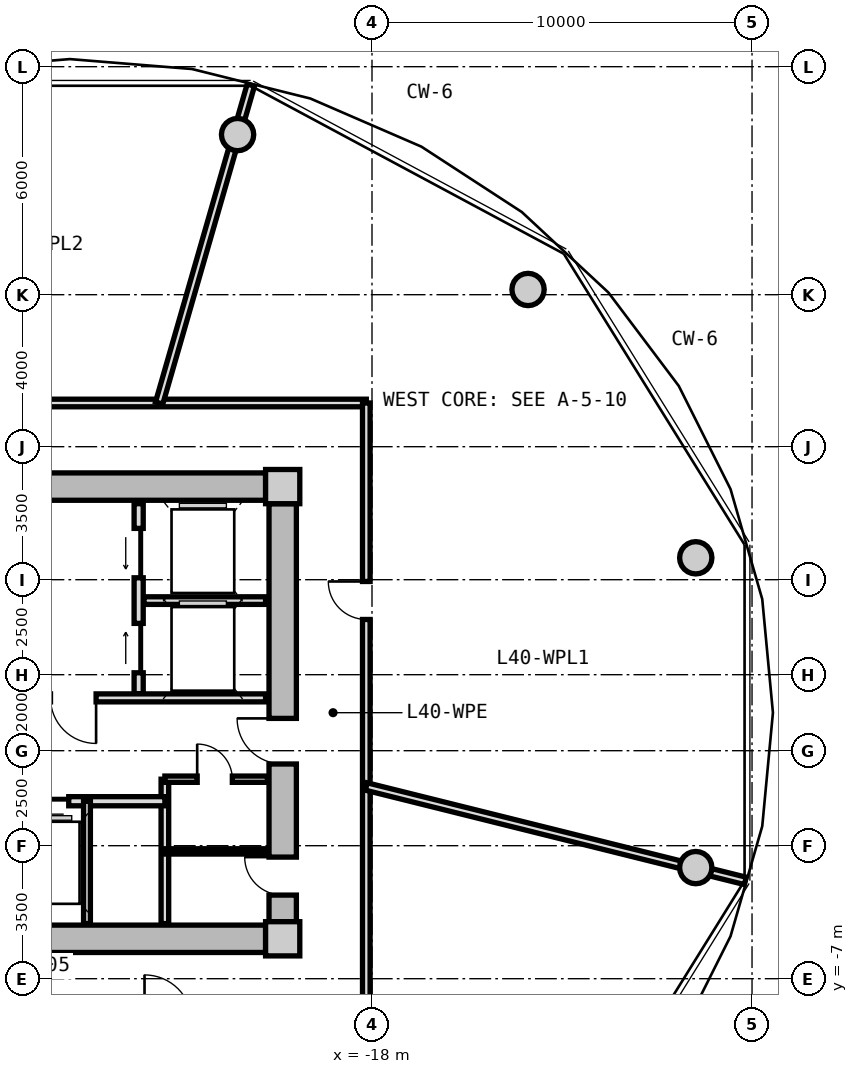
"""IFC4 building model, lengths in metres.
Left out: names, types, materials, properties, quantities, classifications, styles, units other than length and angle.
Written with IfcOpenShell. Run it as: python <this file> out.ifc"""

import sys

from ifc_helpers import new_model, si_unit, direction, frame, frame_2d, origin, origin_2d, place, context, subcontext, project, spatial, rectangle, circle, extrude, source, transform, mapped, element, fill, save


model = new_model("IFC4")
c1 = context("Model", 3, precision=1e-05, world=origin(), true_north=direction((0.0, 1.0)))
c2 = subcontext(c1, "Body", "Model", "MODEL_VIEW")
j1 = project(units=[si_unit("LENGTHUNIT", "METRE"), si_unit("PLANEANGLEUNIT", "RADIAN")], contexts=[c1])
p1 = place(None, origin())
s1 = spatial("IfcSite", under=j1, at=p1, CompositionType="ELEMENT")
p2 = place(p1, origin())
s2 = spatial("IfcBuilding", under=s1, at=p2, CompositionType="ELEMENT")
p3 = place(p2, frame((0.0, 0.0, 129.8)))
s3 = spatial("IfcBuildingStorey", under=s2, at=p3, CompositionType="ELEMENT", Elevation=129.8)
m1 = source(origin(), c2, "Body", "SweptSolid", [
    extrude(rectangle(XDim=0.9, YDim=0.9, at=origin_2d()), origin(), (0.0, 0.0, 1.0), 4.5),
])
for number, where, z_axis, x_axis in (
    (1, (-20.35, -5.95, 0.0), (0.0, 0.0, 1.0), (1.0, 0.0, 0.0)),
    (2, (-20.35, 5.95, 0.0), (0.0, 0.0, 1.0), (1.0, 0.0, 0.0)),
):
    element("IfcColumn", number, at=place(p3, frame(where, z_axis=z_axis, x_axis=x_axis)), inside=s3, PredefinedType="COLUMN", context=c2, shape_type="MappedRepresentation", body=[
        mapped(m1, transform((0.0, 0.0, 0.0), x_axis=(1.0, 0.0, 0.0), y_axis=(0.0, 1.0, 0.0), z_axis=(0.0, 0.0, 1.0), scale=1.0)),
    ])
m2 = source(origin(), c2, "Body", "SweptSolid", [
    extrude(rectangle(XDim=14.4, YDim=0.72, at=frame_2d((7.2, 0.0))), origin(), (0.0, 0.0, 1.0), 4.08),
])
for number, where, z_axis, x_axis in (
    (3, (-35.2, 5.95, 0.0), (0.0, 0.0, 1.0), (1.0, 0.0, 0.0)),
    (4, (-20.8, -5.95, 0.0), (0.0, 0.0, 1.0), (-1.0, 0.0, 0.0)),
):
    element("IfcWall", number, at=place(p3, frame(where, z_axis=z_axis, x_axis=x_axis)), inside=s3, PredefinedType="SHEAR", context=c2, shape_type="MappedRepresentation", body=[
        mapped(m2, transform((0.0, 0.0, 0.0), x_axis=(1.0, 0.0, 0.0), y_axis=(0.0, 1.0, 0.0), z_axis=(0.0, 0.0, 1.0), scale=1.0)),
    ])
m3 = source(origin(), c2, "Body", "SweptSolid", [
    extrude(rectangle(XDim=11.0, YDim=0.72, at=frame_2d((5.5, 0.0))), origin(), (0.0, 0.0, 1.0), 4.08),
])
p4 = place(p3, frame((-20.35, 5.5, 0.0), z_axis=(0.0, 0.0, 1.0), x_axis=(0.0, -1.0, 0.0)))
e5 = element("IfcWall", 5, at=p4, inside=s3, PredefinedType="SHEAR", context=c2, shape_type="MappedRepresentation", body=[
    mapped(m3, transform((0.0, 0.0, 0.0), x_axis=(1.0, 0.0, 0.0), y_axis=(0.0, 1.0, 0.0), z_axis=(0.0, 0.0, 1.0), scale=1.0)),
])
p5 = place(p4, frame((5.65, 0.0, 0.0)))
e6 = element("IfcOpeningElement", 6, at=p5, cuts=e5, PredefinedType="OPENING", context=c2, shape_type="SweptSolid", body=[
    extrude(rectangle(XDim=1.2, YDim=2.15, at=frame_2d((0.6, 1.075))), frame((0.0, 0.37, 0.0), z_axis=(0.0, -1.0, 0.0), x_axis=(1.0, 0.0, 0.0)), (0.0, 0.0, 1.0), 0.74),
])
p6 = place(p4, frame((9.3, 0.0, 0.0)))
e7 = element("IfcOpeningElement", 7, at=p6, cuts=e5, PredefinedType="OPENING", context=c2, shape_type="SweptSolid", body=[
    extrude(rectangle(XDim=1.0, YDim=2.1, at=frame_2d((0.5, 1.05))), frame((0.0, 0.37, 0.0), z_axis=(0.0, -1.0, 0.0), x_axis=(1.0, 0.0, 0.0)), (0.0, 0.0, 1.0), 0.74),
])
m4 = source(origin(), c2, "Body", "SweptSolid", [
    extrude(circle(Radius=0.425, at=origin_2d()), origin(), (0.0, 0.0, 1.0), 4.08),
])
for number, where, z_axis, x_axis in (
    (8, (-9.481, 4.076, 0.0), (0.0, 0.0, 1.0), (1.0, 0.0, 0.0)),
    (9, (-13.894, 11.137, 0.0), (0.0, 0.0, 1.0), (1.0, 0.0, 0.0)),
    (10, (-21.537, 15.213, 0.0), (0.0, 0.0, 1.0), (1.0, 0.0, 0.0)),
    (11, (-9.481, -4.076, 0.0), (0.0, 0.0, 1.0), (1.0, 0.0, 0.0)),
):
    element("IfcColumn", number, at=place(p3, frame(where, z_axis=z_axis, x_axis=x_axis)), inside=s3, PredefinedType="COLUMN", context=c2, shape_type="MappedRepresentation", body=[
        mapped(m4, transform((0.0, 0.0, 0.0), x_axis=(1.0, 0.0, 0.0), y_axis=(0.0, 1.0, 0.0), z_axis=(0.0, 0.0, 1.0), scale=1.0)),
    ])
m5 = source(origin(), c2, "Body", "SweptSolid", [
    extrude(rectangle(XDim=5.0, YDim=0.24, at=frame_2d((2.5, 0.0))), origin(), (0.0, 0.0, 1.0), 4.065),
])
p7 = place(p3, frame((-24.14, 0.5, 0.0), z_axis=(0.0, 0.0, 1.0), x_axis=(0.0, 1.0, 0.0)))
e12 = element("IfcWall", 12, at=p7, inside=s3, PredefinedType="PARTITIONING", context=c2, shape_type="MappedRepresentation", body=[
    mapped(m5, transform((0.0, 0.0, 0.0), x_axis=(1.0, 0.0, 0.0), y_axis=(0.0, 1.0, 0.0), z_axis=(0.0, 0.0, 1.0), scale=1.0)),
])
p8 = place(p7, frame((3.05, 0.0, 0.0)))
e13 = element("IfcOpeningElement", 13, at=p8, cuts=e12, PredefinedType="OPENING", context=c2, shape_type="SweptSolid", body=[
    extrude(rectangle(XDim=1.3, YDim=2.2, at=frame_2d((0.65, 1.1))), frame((0.0, 0.13, 0.0), z_axis=(0.0, -1.0, 0.0), x_axis=(1.0, 0.0, 0.0)), (0.0, 0.0, 1.0), 0.26),
])
p9 = place(p7, frame((0.55, 0.0, 0.0)))
e14 = element("IfcOpeningElement", 14, at=p9, cuts=e12, PredefinedType="OPENING", context=c2, shape_type="SweptSolid", body=[
    extrude(rectangle(XDim=1.3, YDim=2.2, at=frame_2d((0.65, 1.1))), frame((0.0, 0.13, 0.0), z_axis=(0.0, -1.0, 0.0), x_axis=(1.0, 0.0, 0.0)), (0.0, 0.0, 1.0), 0.26),
])
m6 = source(origin(), c2, "Body", "SweptSolid", [
    extrude(rectangle(XDim=3.2, YDim=0.2, at=frame_2d((1.6, 0.0))), origin(), (0.0, 0.0, 1.0), 4.065),
])
p10 = place(p3, frame((-24.0, 2.95, 0.0), z_axis=(0.0, 0.0, 1.0), x_axis=(1.0, 0.0, 0.0)))
e15 = element("IfcWall", 15, at=p10, inside=s3, PredefinedType="PARTITIONING", context=c2, shape_type="MappedRepresentation", body=[
    mapped(m6, transform((0.0, 0.0, 0.0), x_axis=(1.0, 0.0, 0.0), y_axis=(0.0, 1.0, 0.0), z_axis=(0.0, 0.0, 1.0), scale=1.0)),
])
m7 = source(origin(), c2, "Body", "SweptSolid", [
    extrude(rectangle(XDim=6.66, YDim=0.21, at=frame_2d((3.33, 0.0))), origin(), (0.0, 0.0, 1.0), 4.065),
])
p11 = place(p3, frame((-27.46, 0.39, 0.0), z_axis=(0.0, 0.0, 1.0), x_axis=(1.0, 0.0, 0.0)))
e16 = element("IfcWall", 16, at=p11, inside=s3, PredefinedType="PARTITIONING", context=c2, shape_type="MappedRepresentation", body=[
    mapped(m7, transform((0.0, 0.0, 0.0), x_axis=(1.0, 0.0, 0.0), y_axis=(0.0, 1.0, 0.0), z_axis=(0.0, 0.0, 1.0), scale=1.0)),
])
p12 = place(p11, frame((1.0, 0.0, 0.0)))
e17 = element("IfcOpeningElement", 17, at=p12, cuts=e16, PredefinedType="OPENING", context=c2, shape_type="SweptSolid", body=[
    extrude(rectangle(XDim=1.2, YDim=2.15, at=frame_2d((0.6, 1.075))), frame((0.0, 0.115, 0.0), z_axis=(0.0, -1.0, 0.0), x_axis=(1.0, 0.0, 0.0)), (0.0, 0.0, 1.0), 0.23),
])
m8 = source(origin(), c2, "Body", "SweptSolid", [
    extrude(rectangle(XDim=3.8, YDim=0.2, at=frame_2d((1.9, 0.0))), origin(), (0.0, 0.0, 1.0), 4.065),
])
p13 = place(p3, frame((-23.45, -5.55, 0.0), z_axis=(0.0, 0.0, 1.0), x_axis=(0.0, 1.0, 0.0)))
e18 = element("IfcWall", 18, at=p13, inside=s3, PredefinedType="PARTITIONING", context=c2, shape_type="MappedRepresentation", body=[
    mapped(m8, transform((0.0, 0.0, 0.0), x_axis=(1.0, 0.0, 0.0), y_axis=(0.0, 1.0, 0.0), z_axis=(0.0, 0.0, 1.0), scale=1.0)),
])
m9 = source(origin(), c2, "Body", "SweptSolid", [
    extrude(rectangle(XDim=4.13, YDim=0.24, at=frame_2d((2.065, 0.0))), origin(), (0.0, 0.0, 1.0), 4.065),
])
p14 = place(p3, frame((-27.58, -2.33, 0.0), z_axis=(0.0, 0.0, 1.0), x_axis=(1.0, 0.0, 0.0)))
e19 = element("IfcWall", 19, at=p14, inside=s3, PredefinedType="PARTITIONING", context=c2, shape_type="MappedRepresentation", body=[
    mapped(m9, transform((0.0, 0.0, 0.0), x_axis=(1.0, 0.0, 0.0), y_axis=(0.0, 1.0, 0.0), z_axis=(0.0, 0.0, 1.0), scale=1.0)),
])
p15 = place(p14, frame((0.5, 0.0, 0.0)))
e20 = element("IfcOpeningElement", 20, at=p15, cuts=e19, PredefinedType="OPENING", context=c2, shape_type="SweptSolid", body=[
    extrude(rectangle(XDim=1.1, YDim=2.2, at=frame_2d((0.55, 1.1))), frame((0.0, 0.13, 0.0), z_axis=(0.0, -1.0, 0.0), x_axis=(1.0, 0.0, 0.0)), (0.0, 0.0, 1.0), 0.26),
])
m10 = source(origin(), c2, "Body", "SweptSolid", [
    extrude(rectangle(XDim=3.22, YDim=0.18, at=frame_2d((1.61, 0.0))), origin(), (0.0, 0.0, 1.0), 4.065),
])
p16 = place(p3, frame((-25.5, -5.55, 0.0), z_axis=(0.0, 0.0, 1.0), x_axis=(0.0, 1.0, 0.0)))
e21 = element("IfcWall", 21, at=p16, inside=s3, PredefinedType="PARTITIONING", context=c2, shape_type="MappedRepresentation", body=[
    mapped(m10, transform((0.0, 0.0, 0.0), x_axis=(1.0, 0.0, 0.0), y_axis=(0.0, 1.0, 0.0), z_axis=(0.0, 0.0, 1.0), scale=1.0)),
])
m11 = source(origin(), c2, "Body", "SweptSolid", [
    extrude(rectangle(XDim=2.7, YDim=0.165, at=frame_2d((1.35, 0.0))), origin(), (0.0, 0.0, 1.0), 4.065),
])
p17 = place(p3, frame((-23.45, -1.75, 0.0), z_axis=(0.0, 0.0, 1.0), x_axis=(1.0, 0.0, 0.0)))
e22 = element("IfcWall", 22, at=p17, inside=s3, PredefinedType="PARTITIONING", context=c2, shape_type="MappedRepresentation", body=[
    mapped(m11, transform((0.0, 0.0, 0.0), x_axis=(1.0, 0.0, 0.0), y_axis=(0.0, 1.0, 0.0), z_axis=(0.0, 0.0, 1.0), scale=1.0)),
])
p18 = place(p17, frame((0.85, 0.0, 0.0)))
e23 = element("IfcOpeningElement", 23, at=p18, cuts=e22, PredefinedType="OPENING", context=c2, shape_type="SweptSolid", body=[
    extrude(rectangle(XDim=0.925, YDim=2.1, at=frame_2d((0.462, 1.05))), frame((0.0, 0.093, 0.0), z_axis=(0.0, -1.0, 0.0), x_axis=(1.0, 0.0, 0.0)), (0.0, 0.0, 1.0), 0.185),
])
m12 = source(origin(), c2, "Body", "SweptSolid", [
    extrude(rectangle(XDim=2.7, YDim=0.14, at=frame_2d((1.35, 0.0))), origin(), (0.0, 0.0, 1.0), 4.065),
])
p19 = place(p3, frame((-23.45, -3.65, 0.0), z_axis=(0.0, 0.0, 1.0), x_axis=(1.0, 0.0, 0.0)))
e24 = element("IfcWall", 24, at=p19, inside=s3, PredefinedType="PARTITIONING", context=c2, shape_type="MappedRepresentation", body=[
    mapped(m12, transform((0.0, 0.0, 0.0), x_axis=(1.0, 0.0, 0.0), y_axis=(0.0, 1.0, 0.0), z_axis=(0.0, 0.0, 1.0), scale=1.0)),
])
m13 = source(origin(), c2, "Body", "SweptSolid", [
    extrude(rectangle(XDim=19.7, YDim=0.2, at=frame_2d((9.85, 0.0))), origin(), (0.0, 0.0, 1.0), 4.065),
])
p20 = place(p3, frame((-37.85, 8.15, 0.0), z_axis=(0.0, 0.0, 1.0), x_axis=(1.0, 0.0, 0.0)))
e25 = element("IfcWall", 25, at=p20, inside=s3, PredefinedType="PARTITIONING", context=c2, shape_type="MappedRepresentation", body=[
    mapped(m13, transform((0.0, 0.0, 0.0), x_axis=(1.0, 0.0, 0.0), y_axis=(0.0, 1.0, 0.0), z_axis=(0.0, 0.0, 1.0), scale=1.0)),
])
p21 = place(p20, frame((6.761, 0.0, 0.0)))
e26 = element("IfcOpeningElement", 26, at=p21, cuts=e25, PredefinedType="OPENING", context=c2, shape_type="SweptSolid", body=[
    extrude(rectangle(XDim=1.0, YDim=2.1, at=frame_2d((0.5, 1.05))), frame((0.0, 0.11, 0.0), z_axis=(0.0, -1.0, 0.0), x_axis=(1.0, 0.0, 0.0)), (0.0, 0.0, 1.0), 0.22),
])
m14 = source(origin(), c2, "Body", "SweptSolid", [
    extrude(rectangle(XDim=16.3, YDim=0.2, at=frame_2d((8.15, 0.0))), origin(), (0.0, 0.0, 1.0), 4.065),
])
p22 = place(p3, frame((-18.15, 8.15, 0.0), z_axis=(0.0, 0.0, 1.0), x_axis=(0.0, -1.0, 0.0)))
e27 = element("IfcWall", 27, at=p22, inside=s3, PredefinedType="PARTITIONING", context=c2, shape_type="MappedRepresentation", body=[
    mapped(m14, transform((0.0, 0.0, 0.0), x_axis=(1.0, 0.0, 0.0), y_axis=(0.0, 1.0, 0.0), z_axis=(0.0, 0.0, 1.0), scale=1.0)),
])
p23 = place(p22, frame((4.697, 0.0, 0.0)))
e28 = element("IfcOpeningElement", 28, at=p23, cuts=e27, PredefinedType="OPENING", context=c2, shape_type="SweptSolid", body=[
    extrude(rectangle(XDim=1.0, YDim=2.1, at=frame_2d((0.5, 1.05))), frame((0.0, 0.11, 0.0), z_axis=(0.0, -1.0, 0.0), x_axis=(1.0, 0.0, 0.0)), (0.0, 0.0, 1.0), 0.22),
])
m15 = source(origin(), c2, "Body", "SweptSolid", [
    extrude(rectangle(XDim=10.277, YDim=0.2, at=frame_2d((5.139, 0.0))), origin(), (0.0, 0.0, 1.0), 4.065),
])
p24 = place(p3, frame((-18.15, -1.942, 0.0), z_axis=(0.0, 0.0, 1.0), x_axis=(0.970367056385, -0.241635626271, 0.0)))
e29 = element("IfcWall", 29, at=p24, inside=s3, PredefinedType="PARTITIONING", context=c2, shape_type="MappedRepresentation", body=[
    mapped(m15, transform((0.0, 0.0, 0.0), x_axis=(1.0, 0.0, 0.0), y_axis=(0.0, 1.0, 0.0), z_axis=(0.0, 0.0, 1.0), scale=1.0)),
])
m16 = source(origin(), c2, "Body", "SweptSolid", [
    extrude(rectangle(XDim=8.708, YDim=0.2, at=frame_2d((4.354, 0.0))), origin(), (0.0, 0.0, 1.0), 4.065),
])
p25 = place(p3, frame((-23.6, 8.15, 0.0), z_axis=(0.0, 0.0, 1.0), x_axis=(0.277019790717, 0.960864212858, 0.0)))
e30 = element("IfcWall", 30, at=p25, inside=s3, PredefinedType="PARTITIONING", context=c2, shape_type="MappedRepresentation", body=[
    mapped(m16, transform((0.0, 0.0, 0.0), x_axis=(1.0, 0.0, 0.0), y_axis=(0.0, 1.0, 0.0), z_axis=(0.0, 0.0, 1.0), scale=1.0)),
])
m17 = source(origin(), c2, "Body", "SweptSolid", [
    extrude(rectangle(XDim=1.3, YDim=2.2, at=frame_2d((0.65, 1.1))), frame((0.0, 0.025, 0.0), z_axis=(0.0, -1.0, 0.0), x_axis=(1.0, 0.0, 0.0)), (0.0, 0.0, 1.0), 0.05),
])
p26 = place(p8, origin())
e31 = element("IfcDoor", 31, at=p26, inside=s3, OperationType="SLIDING_TO_LEFT", PredefinedType="DOOR", context=c2, shape_type="MappedRepresentation", body=[
    mapped(m17, transform((0.0, 0.0, 0.0), x_axis=(1.0, 0.0, 0.0), y_axis=(0.0, 1.0, 0.0), z_axis=(0.0, 0.0, 1.0), scale=1.0)),
])
fill(e13, e31)
p27 = place(p9, origin())
e32 = element("IfcDoor", 32, at=p27, inside=s3, OperationType="SLIDING_TO_RIGHT", PredefinedType="DOOR", context=c2, shape_type="MappedRepresentation", body=[
    mapped(m17, transform((0.0, 0.0, 0.0), x_axis=(1.0, 0.0, 0.0), y_axis=(0.0, 1.0, 0.0), z_axis=(0.0, 0.0, 1.0), scale=1.0)),
])
fill(e14, e32)
m18 = source(origin(), c2, "Body", "SweptSolid", [
    extrude(rectangle(XDim=1.2, YDim=2.15, at=frame_2d((0.6, 1.075))), frame((0.0, 0.025, 0.0), z_axis=(0.0, -1.0, 0.0), x_axis=(1.0, 0.0, 0.0)), (0.0, 0.0, 1.0), 0.05),
])
p28 = place(p12, frame((1.2, 0.0, 0.0), z_axis=(0.0, 0.0, 1.0), x_axis=(-1.0, 0.0, 0.0)))
e33 = element("IfcDoor", 33, at=p28, inside=s3, OperationType="SINGLE_SWING_LEFT", PredefinedType="DOOR", context=c2, shape_type="MappedRepresentation", body=[
    mapped(m18, transform((0.0, 0.0, 0.0), x_axis=(1.0, 0.0, 0.0), y_axis=(0.0, 1.0, 0.0), z_axis=(0.0, 0.0, 1.0), scale=1.0)),
])
fill(e17, e33)
p29 = place(p5, frame((1.2, 0.0, 0.0), z_axis=(0.0, 0.0, 1.0), x_axis=(-1.0, 0.0, 0.0)))
e34 = element("IfcDoor", 34, at=p29, inside=s3, OperationType="SINGLE_SWING_RIGHT", PredefinedType="DOOR", context=c2, shape_type="MappedRepresentation", body=[
    mapped(m18, transform((0.0, 0.0, 0.0), x_axis=(1.0, 0.0, 0.0), y_axis=(0.0, 1.0, 0.0), z_axis=(0.0, 0.0, 1.0), scale=1.0)),
])
fill(e6, e34)
m19 = source(origin(), c2, "Body", "SweptSolid", [
    extrude(rectangle(XDim=1.1, YDim=2.2, at=frame_2d((0.55, 1.1))), frame((0.0, 0.025, 0.0), z_axis=(0.0, -1.0, 0.0), x_axis=(1.0, 0.0, 0.0)), (0.0, 0.0, 1.0), 0.05),
])
p30 = place(p15, frame((1.1, 0.0, 0.0), z_axis=(0.0, 0.0, 1.0), x_axis=(-1.0, 0.0, 0.0)))
e35 = element("IfcDoor", 35, at=p30, inside=s3, OperationType="SLIDING_TO_LEFT", PredefinedType="DOOR", context=c2, shape_type="MappedRepresentation", body=[
    mapped(m19, transform((0.0, 0.0, 0.0), x_axis=(1.0, 0.0, 0.0), y_axis=(0.0, 1.0, 0.0), z_axis=(0.0, 0.0, 1.0), scale=1.0)),
])
fill(e20, e35)
m20 = source(origin(), c2, "Body", "SweptSolid", [
    extrude(rectangle(XDim=0.925, YDim=2.1, at=frame_2d((0.462, 1.05))), frame((0.0, 0.025, 0.0), z_axis=(0.0, -1.0, 0.0), x_axis=(1.0, 0.0, 0.0)), (0.0, 0.0, 1.0), 0.05),
])
p31 = place(p18, origin())
e36 = element("IfcDoor", 36, at=p31, inside=s3, OperationType="SINGLE_SWING_LEFT", PredefinedType="DOOR", context=c2, shape_type="MappedRepresentation", body=[
    mapped(m20, transform((0.0, 0.0, 0.0), x_axis=(1.0, 0.0, 0.0), y_axis=(0.0, 1.0, 0.0), z_axis=(0.0, 0.0, 1.0), scale=1.0)),
])
fill(e23, e36)
m21 = source(origin(), c2, "Body", "SweptSolid", [
    extrude(rectangle(XDim=1.0, YDim=2.1, at=frame_2d((0.5, 1.05))), frame((0.0, 0.025, 0.0), z_axis=(0.0, -1.0, 0.0), x_axis=(1.0, 0.0, 0.0)), (0.0, 0.0, 1.0), 0.05),
])
p32 = place(p6, frame((1.0, 0.0, 0.0), z_axis=(0.0, 0.0, 1.0), x_axis=(-1.0, 0.0, 0.0)))
e37 = element("IfcDoor", 37, at=p32, inside=s3, OperationType="SINGLE_SWING_RIGHT", PredefinedType="DOOR", context=c2, shape_type="MappedRepresentation", body=[
    mapped(m21, transform((0.0, 0.0, 0.0), x_axis=(1.0, 0.0, 0.0), y_axis=(0.0, 1.0, 0.0), z_axis=(0.0, 0.0, 1.0), scale=1.0)),
])
fill(e7, e37)
p33 = place(p23, frame((1.0, 0.0, 0.0), z_axis=(0.0, 0.0, 1.0), x_axis=(-1.0, 0.0, 0.0)))
e38 = element("IfcDoor", 38, at=p33, inside=s3, OperationType="SINGLE_SWING_RIGHT", PredefinedType="DOOR", context=c2, shape_type="MappedRepresentation", body=[
    mapped(m21, transform((0.0, 0.0, 0.0), x_axis=(1.0, 0.0, 0.0), y_axis=(0.0, 1.0, 0.0), z_axis=(0.0, 0.0, 1.0), scale=1.0)),
])
fill(e28, e38)
save(model, sys.argv[1])
